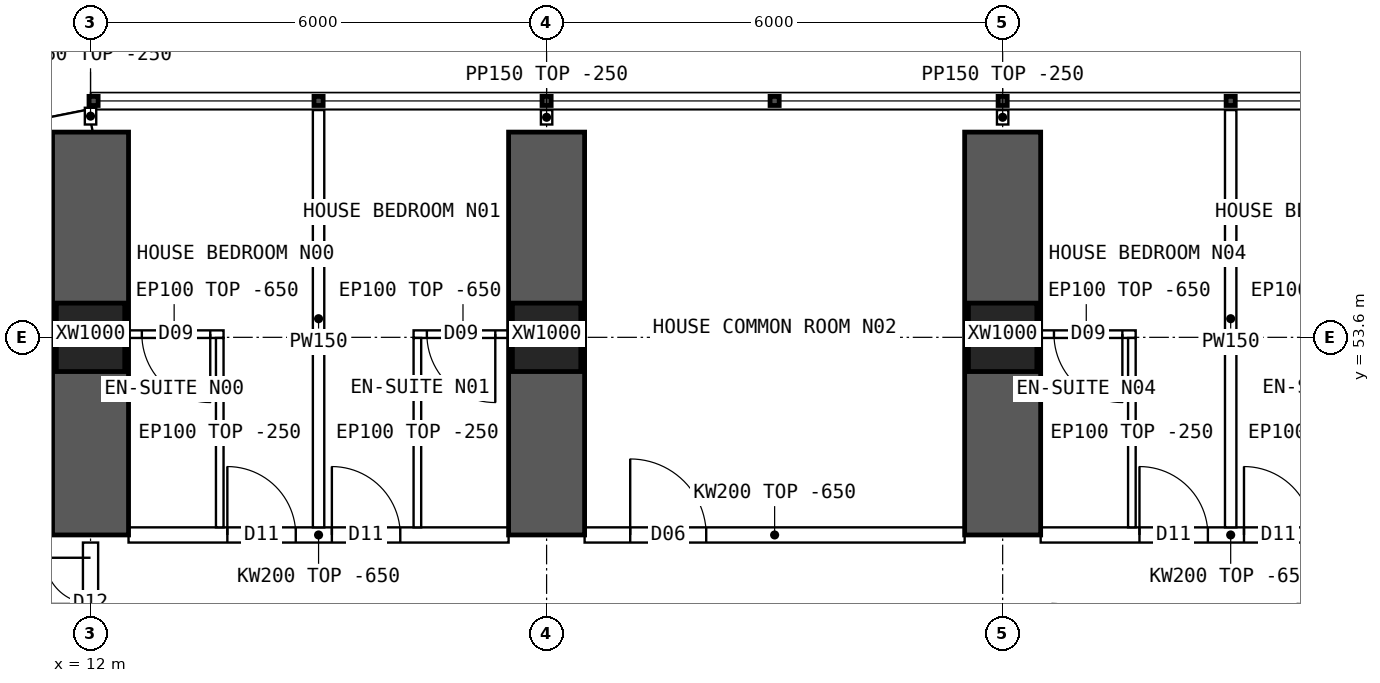
"""IFC4 building model, lengths in metres.
Left out: names, types, materials, properties, quantities, classifications, styles, units other than length and angle.
Written with IfcOpenShell. Run it as: python <this file> out.ifc"""

import sys

from ifc_helpers import new_model, si_unit, direction, frame, frame_2d, origin, origin_2d, place, context, subcontext, project, spatial, polyline, rectangle, hollow_rectangle, outline, extrude, element, fill, save


model = new_model("IFC4")
c1 = context("Model", 3, precision=1e-05, world=origin(), true_north=direction((0.0, 1.0)))
c2 = subcontext(c1, "Body", "Model", "MODEL_VIEW")
j1 = project(units=[si_unit("LENGTHUNIT", "METRE"), si_unit("PLANEANGLEUNIT", "RADIAN")], contexts=[c1])
p1 = place(None, origin())
s1 = spatial("IfcSite", under=j1, at=p1, CompositionType="ELEMENT")
p2 = place(p1, origin())
s2 = spatial("IfcBuilding", under=s1, at=p2, CompositionType="ELEMENT")
p3 = place(p2, frame((0.0, 0.0, 61.45)))
s3 = spatial("IfcBuildingStorey", under=s2, at=p3, CompositionType="ELEMENT", Elevation=61.45)
for number, where, z_axis, x_axis in (
    (1, (12.0, 53.6, 0.0), (0.0, 0.0, 1.0), (1.0, 0.0, 0.0)),
    (2, (18.0, 53.6, 0.0), (0.0, 0.0, 1.0), (1.0, 0.0, 0.0)),
    (3, (24.0, 53.6, 0.0), (0.0, 0.0, 1.0), (1.0, 0.0, 0.0)),
):
    element("IfcColumn", number, at=place(p3, frame(where, z_axis=z_axis, x_axis=x_axis)), inside=s3, PredefinedType="COLUMN", context=c2, shape_type="SweptSolid", body=[
        extrude(hollow_rectangle(XDim=0.9, YDim=0.9, WallThickness=0.09, at=origin_2d()), origin(), (0.0, 0.0, 1.0), 3.75),
    ])
for number, where, z_axis, x_axis in (
    (4, (12.0, 51.0, 0.0), (0.0, 0.0, 1.0), (0.0, 1.0, 0.0)),
    (5, (18.0, 51.0, 0.0), (0.0, 0.0, 1.0), (0.0, 1.0, 0.0)),
    (6, (24.0, 51.0, 0.0), (0.0, 0.0, 1.0), (0.0, 1.0, 0.0)),
):
    element("IfcWall", number, at=place(p3, frame(where, z_axis=z_axis, x_axis=x_axis)), inside=s3, PredefinedType="SHEAR", context=c2, shape_type="SweptSolid", body=[
        extrude(rectangle(XDim=5.3, YDim=1.0, at=frame_2d((2.65, 0.0))), origin(), (0.0, 0.0, 1.0), 3.75),
    ])
p4 = place(p3, frame((12.0, 56.45, 0.0), z_axis=(0.0, 0.0, 1.0), x_axis=(-0.980787251524, -0.195080412259, 0.0)))
e7 = element("IfcWall", 7, at=p4, inside=s3, PredefinedType="SOLIDWALL", context=c2, shape_type="SweptSolid", body=[
    extrude(outline(polyline([(-0.03, -0.15), (3.249, -0.15), (3.189, 0.15), (0.03, 0.15), (-0.03, -0.15)])), origin(), (0.0, 0.0, 1.0), 3.5),
])
p5 = place(p4, frame((0.909, 0.0, 0.9)))
e8 = element("IfcOpeningElement", 8, at=p5, cuts=e7, PredefinedType="OPENING", context=c2, shape_type="SweptSolid", body=[
    extrude(rectangle(XDim=1.4, YDim=1.8, at=frame_2d((0.7, 0.9))), frame((0.0, 0.16, 0.0), z_axis=(0.0, -1.0, 0.0), x_axis=(1.0, 0.0, 0.0)), (0.0, 0.0, 1.0), 0.32),
])
p6 = place(p3, frame((12.5, 51.0, 0.0), z_axis=(0.0, 0.0, 1.0), x_axis=(1.0, 0.0, 0.0)))
e9 = element("IfcWall", 9, at=p6, inside=s3, PredefinedType="SOLIDWALL", context=c2, shape_type="SweptSolid", body=[
    extrude(outline(polyline([(0.0, 0.0), (5.0, 0.0), (5.0, 3.1), (0.0, 3.1), (0.0, 0.0)])), frame((0.0, 0.1, 0.0), z_axis=(0.0, -1.0, 0.0), x_axis=(1.0, 0.0, 0.0)), (0.0, 0.0, 1.0), 0.2),
])
p7 = place(p6, frame((1.3, 0.0, 0.0)))
e10 = element("IfcOpeningElement", 10, at=p7, cuts=e9, PredefinedType="OPENING", context=c2, shape_type="SweptSolid", body=[
    extrude(rectangle(XDim=0.9, YDim=2.1, at=frame_2d((0.45, 1.05))), frame((0.0, 0.11, 0.0), z_axis=(0.0, -1.0, 0.0), x_axis=(1.0, 0.0, 0.0)), (0.0, 0.0, 1.0), 0.22),
])
p8 = place(p6, frame((2.675, 0.0, 0.0)))
e11 = element("IfcOpeningElement", 11, at=p8, cuts=e9, PredefinedType="OPENING", context=c2, shape_type="SweptSolid", body=[
    extrude(rectangle(XDim=0.9, YDim=2.1, at=frame_2d((0.45, 1.05))), frame((0.0, 0.11, 0.0), z_axis=(0.0, -1.0, 0.0), x_axis=(1.0, 0.0, 0.0)), (0.0, 0.0, 1.0), 0.22),
])
p9 = place(p3, frame((18.5, 51.0, 0.0), z_axis=(0.0, 0.0, 1.0), x_axis=(1.0, 0.0, 0.0)))
e12 = element("IfcWall", 12, at=p9, inside=s3, PredefinedType="SOLIDWALL", context=c2, shape_type="SweptSolid", body=[
    extrude(outline(polyline([(0.0, 0.0), (5.0, 0.0), (5.0, 3.1), (0.0, 3.1), (0.0, 0.0)])), frame((0.0, 0.1, 0.0), z_axis=(0.0, -1.0, 0.0), x_axis=(1.0, 0.0, 0.0)), (0.0, 0.0, 1.0), 0.2),
])
p10 = place(p9, frame((0.6, 0.0, 0.0)))
e13 = element("IfcOpeningElement", 13, at=p10, cuts=e12, PredefinedType="OPENING", context=c2, shape_type="SweptSolid", body=[
    extrude(rectangle(XDim=1.0, YDim=2.1, at=frame_2d((0.5, 1.05))), frame((0.0, 0.11, 0.0), z_axis=(0.0, -1.0, 0.0), x_axis=(1.0, 0.0, 0.0)), (0.0, 0.0, 1.0), 0.22),
])
p11 = place(p3, frame((24.5, 51.0, 0.0), z_axis=(0.0, 0.0, 1.0), x_axis=(1.0, 0.0, 0.0)))
e14 = element("IfcWall", 14, at=p11, inside=s3, PredefinedType="SOLIDWALL", context=c2, shape_type="SweptSolid", body=[
    extrude(outline(polyline([(0.0, 0.0), (5.0, 0.0), (5.0, 3.1), (0.0, 3.1), (0.0, 0.0)])), frame((0.0, 0.1, 0.0), z_axis=(0.0, -1.0, 0.0), x_axis=(1.0, 0.0, 0.0)), (0.0, 0.0, 1.0), 0.2),
])
p12 = place(p11, frame((1.3, 0.0, 0.0)))
e15 = element("IfcOpeningElement", 15, at=p12, cuts=e14, PredefinedType="OPENING", context=c2, shape_type="SweptSolid", body=[
    extrude(rectangle(XDim=0.9, YDim=2.1, at=frame_2d((0.45, 1.05))), frame((0.0, 0.11, 0.0), z_axis=(0.0, -1.0, 0.0), x_axis=(1.0, 0.0, 0.0)), (0.0, 0.0, 1.0), 0.22),
])
p13 = place(p11, frame((2.675, 0.0, 0.0)))
e16 = element("IfcOpeningElement", 16, at=p13, cuts=e14, PredefinedType="OPENING", context=c2, shape_type="SweptSolid", body=[
    extrude(rectangle(XDim=0.9, YDim=2.1, at=frame_2d((0.45, 1.05))), frame((0.0, 0.11, 0.0), z_axis=(0.0, -1.0, 0.0), x_axis=(1.0, 0.0, 0.0)), (0.0, 0.0, 1.0), 0.22),
])
p14 = place(p3, frame((15.0, 56.59, 0.0), z_axis=(0.0, 0.0, 1.0), x_axis=(0.0, -1.0, 0.0)))
e17 = element("IfcWall", 17, at=p14, inside=s3, PredefinedType="PARTITIONING", context=c2, shape_type="SweptSolid", body=[
    extrude(outline(polyline([(0.0, 0.0), (5.49, 0.0), (5.49, 3.1), (5.442, 3.1), (5.44, 3.5), (3.192, 3.5), (3.19, 3.1), (2.792, 3.1), (2.79, 3.5), (0.0, 3.5), (0.0, 0.0)])), frame((0.0, 0.075, 0.0), z_axis=(0.0, -1.0, 0.0), x_axis=(1.0, 0.0, 0.0)), (0.0, 0.0, 1.0), 0.15),
])
p15 = place(p3, frame((12.45, 53.642, 0.0), z_axis=(0.0, 0.0, 1.0), x_axis=(1.0, 0.0, 0.0)))
e18 = element("IfcWall", 18, at=p15, inside=s3, PredefinedType="PARTITIONING", context=c2, shape_type="SweptSolid", body=[
    extrude(outline(polyline([(0.0, 0.0), (1.3, 0.0), (1.3, 3.1), (0.0, 3.1), (0.0, 0.0)])), frame((0.0, 0.05, 0.0), z_axis=(0.0, -1.0, 0.0), x_axis=(1.0, 0.0, 0.0)), (0.0, 0.0, 1.0), 0.1),
])
p16 = place(p15, frame((0.225, 0.0, 0.0)))
e19 = element("IfcOpeningElement", 19, at=p16, cuts=e18, PredefinedType="OPENING", context=c2, shape_type="SweptSolid", body=[
    extrude(rectangle(XDim=0.9, YDim=2.1, at=frame_2d((0.45, 1.05))), frame((0.0, 0.06, 0.0), z_axis=(0.0, -1.0, 0.0), x_axis=(1.0, 0.0, 0.0)), (0.0, 0.0, 1.0), 0.12),
])
p17 = place(p3, frame((13.7, 53.592, 0.0), z_axis=(0.0, 0.0, 1.0), x_axis=(0.0, -1.0, 0.0)))
e20 = element("IfcWall", 20, at=p17, inside=s3, PredefinedType="PARTITIONING", context=c2, shape_type="SweptSolid", body=[
    extrude(outline(polyline([(0.0, 0.0), (2.492, 0.0), (2.492, 3.1), (2.444, 3.1), (2.442, 3.5), (0.194, 3.5), (0.192, 3.1), (0.0, 3.1), (0.0, 0.0)])), frame((0.0, 0.05, 0.0), z_axis=(0.0, -1.0, 0.0), x_axis=(1.0, 0.0, 0.0)), (0.0, 0.0, 1.0), 0.1),
])
p18 = place(p3, frame((16.25, 53.642, 0.0), z_axis=(0.0, 0.0, 1.0), x_axis=(1.0, 0.0, 0.0)))
e21 = element("IfcWall", 21, at=p18, inside=s3, PredefinedType="PARTITIONING", context=c2, shape_type="SweptSolid", body=[
    extrude(outline(polyline([(0.0, 0.0), (1.3, 0.0), (1.3, 3.1), (0.0, 3.1), (0.0, 0.0)])), frame((0.0, 0.05, 0.0), z_axis=(0.0, -1.0, 0.0), x_axis=(1.0, 0.0, 0.0)), (0.0, 0.0, 1.0), 0.1),
])
p19 = place(p18, frame((0.175, 0.0, 0.0)))
e22 = element("IfcOpeningElement", 22, at=p19, cuts=e21, PredefinedType="OPENING", context=c2, shape_type="SweptSolid", body=[
    extrude(rectangle(XDim=0.9, YDim=2.1, at=frame_2d((0.45, 1.05))), frame((0.0, 0.06, 0.0), z_axis=(0.0, -1.0, 0.0), x_axis=(1.0, 0.0, 0.0)), (0.0, 0.0, 1.0), 0.12),
])
p20 = place(p3, frame((16.3, 53.592, 0.0), z_axis=(0.0, 0.0, 1.0), x_axis=(0.0, -1.0, 0.0)))
e23 = element("IfcWall", 23, at=p20, inside=s3, PredefinedType="PARTITIONING", context=c2, shape_type="SweptSolid", body=[
    extrude(outline(polyline([(0.0, 0.0), (2.492, 0.0), (2.492, 3.1), (2.444, 3.1), (2.442, 3.5), (0.194, 3.5), (0.192, 3.1), (0.0, 3.1), (0.0, 0.0)])), frame((0.0, 0.05, 0.0), z_axis=(0.0, -1.0, 0.0), x_axis=(1.0, 0.0, 0.0)), (0.0, 0.0, 1.0), 0.1),
])
p21 = place(p3, frame((27.0, 56.59, 0.0), z_axis=(0.0, 0.0, 1.0), x_axis=(0.0, -1.0, 0.0)))
e24 = element("IfcWall", 24, at=p21, inside=s3, PredefinedType="PARTITIONING", context=c2, shape_type="SweptSolid", body=[
    extrude(outline(polyline([(0.0, 0.0), (5.49, 0.0), (5.49, 3.1), (5.442, 3.1), (5.44, 3.5), (3.192, 3.5), (3.19, 3.1), (2.792, 3.1), (2.79, 3.5), (0.0, 3.5), (0.0, 0.0)])), frame((0.0, 0.075, 0.0), z_axis=(0.0, -1.0, 0.0), x_axis=(1.0, 0.0, 0.0)), (0.0, 0.0, 1.0), 0.15),
])
p22 = place(p3, frame((24.45, 53.642, 0.0), z_axis=(0.0, 0.0, 1.0), x_axis=(1.0, 0.0, 0.0)))
e25 = element("IfcWall", 25, at=p22, inside=s3, PredefinedType="PARTITIONING", context=c2, shape_type="SweptSolid", body=[
    extrude(outline(polyline([(0.0, 0.0), (1.3, 0.0), (1.3, 3.1), (0.0, 3.1), (0.0, 0.0)])), frame((0.0, 0.05, 0.0), z_axis=(0.0, -1.0, 0.0), x_axis=(1.0, 0.0, 0.0)), (0.0, 0.0, 1.0), 0.1),
])
p23 = place(p22, frame((0.225, 0.0, 0.0)))
e26 = element("IfcOpeningElement", 26, at=p23, cuts=e25, PredefinedType="OPENING", context=c2, shape_type="SweptSolid", body=[
    extrude(rectangle(XDim=0.9, YDim=2.1, at=frame_2d((0.45, 1.05))), frame((0.0, 0.06, 0.0), z_axis=(0.0, -1.0, 0.0), x_axis=(1.0, 0.0, 0.0)), (0.0, 0.0, 1.0), 0.12),
])
p24 = place(p3, frame((25.7, 53.592, 0.0), z_axis=(0.0, 0.0, 1.0), x_axis=(0.0, -1.0, 0.0)))
e27 = element("IfcWall", 27, at=p24, inside=s3, PredefinedType="PARTITIONING", context=c2, shape_type="SweptSolid", body=[
    extrude(outline(polyline([(0.0, 0.0), (2.492, 0.0), (2.492, 3.1), (2.444, 3.1), (2.442, 3.5), (0.194, 3.5), (0.192, 3.1), (0.0, 3.1), (0.0, 0.0)])), frame((0.0, 0.05, 0.0), z_axis=(0.0, -1.0, 0.0), x_axis=(1.0, 0.0, 0.0)), (0.0, 0.0, 1.0), 0.1),
])
p25 = place(p3, frame((12.0, 49.3, 0.0), z_axis=(0.0, 0.0, 1.0), x_axis=(0.0, 1.0, 0.0)))
e28 = element("IfcWall", 28, at=p25, inside=s3, PredefinedType="SOLIDWALL", context=c2, shape_type="SweptSolid", body=[
    extrude(outline(polyline([(0.0, 0.0), (1.6, 0.0), (1.6, 3.05), (0.0, 3.05), (0.0, 0.0)])), frame((0.0, 0.1, 0.0), z_axis=(0.0, -1.0, 0.0), x_axis=(1.0, 0.0, 0.0)), (0.0, 0.0, 1.0), 0.2),
])
p26 = place(p25, frame((0.2, 0.0, 0.0)))
e29 = element("IfcOpeningElement", 29, at=p26, cuts=e28, PredefinedType="OPENING", context=c2, shape_type="SweptSolid", body=[
    extrude(rectangle(XDim=1.2, YDim=2.1, at=frame_2d((0.6, 1.05))), frame((0.0, 0.11, 0.0), z_axis=(0.0, -1.0, 0.0), x_axis=(1.0, 0.0, 0.0)), (0.0, 0.0, 1.0), 0.22),
])
p27 = place(p3, frame((12.0, 56.4, 0.0), z_axis=(0.0, 0.0, 1.0), x_axis=(0.0, 1.0, 0.0)))
e30 = element("IfcWall", 30, at=p27, inside=s3, PredefinedType="PARTITIONING", context=c2, shape_type="SweptSolid", body=[
    extrude(rectangle(XDim=0.22, YDim=0.15, at=frame_2d((0.11, 0.0))), origin(), (0.0, 0.0, 1.0), 3.5),
])
for number, where, z_axis, x_axis in (
    (31, (18.0, 56.4, 0.0), (0.0, 0.0, 1.0), (0.0, 1.0, 0.0)),
    (32, (24.0, 56.4, 0.0), (0.0, 0.0, 1.0), (0.0, 1.0, 0.0)),
):
    element("IfcWall", number, at=place(p3, frame(where, z_axis=z_axis, x_axis=x_axis)), inside=s3, PredefinedType="PARTITIONING", context=c2, shape_type="SweptSolid", body=[
        extrude(rectangle(XDim=0.19, YDim=0.15, at=frame_2d((0.095, 0.0))), origin(), (0.0, 0.0, 1.0), 3.5),
    ])
p28 = place(p16, origin())
e33 = element("IfcDoor", 33, at=p28, inside=s3, OperationType="SINGLE_SWING_RIGHT", PredefinedType="DOOR", context=c2, shape_type="SweptSolid", body=[
    extrude(rectangle(XDim=0.9, YDim=2.1, at=frame_2d((0.45, 1.05))), frame((0.0, 0.025, 0.0), z_axis=(0.0, -1.0, 0.0), x_axis=(1.0, 0.0, 0.0)), (0.0, 0.0, 1.0), 0.05),
])
fill(e19, e33)
p29 = place(p7, origin())
e34 = element("IfcDoor", 34, at=p29, inside=s3, OperationType="SINGLE_SWING_LEFT", PredefinedType="DOOR", context=c2, shape_type="SweptSolid", body=[
    extrude(rectangle(XDim=0.9, YDim=2.1, at=frame_2d((0.45, 1.05))), frame((0.0, 0.025, 0.0), z_axis=(0.0, -1.0, 0.0), x_axis=(1.0, 0.0, 0.0)), (0.0, 0.0, 1.0), 0.05),
])
fill(e10, e34)
p30 = place(p19, origin())
e35 = element("IfcDoor", 35, at=p30, inside=s3, OperationType="SINGLE_SWING_RIGHT", PredefinedType="DOOR", context=c2, shape_type="SweptSolid", body=[
    extrude(rectangle(XDim=0.9, YDim=2.1, at=frame_2d((0.45, 1.05))), frame((0.0, 0.025, 0.0), z_axis=(0.0, -1.0, 0.0), x_axis=(1.0, 0.0, 0.0)), (0.0, 0.0, 1.0), 0.05),
])
fill(e22, e35)
p31 = place(p8, origin())
e36 = element("IfcDoor", 36, at=p31, inside=s3, OperationType="SINGLE_SWING_LEFT", PredefinedType="DOOR", context=c2, shape_type="SweptSolid", body=[
    extrude(rectangle(XDim=0.9, YDim=2.1, at=frame_2d((0.45, 1.05))), frame((0.0, 0.025, 0.0), z_axis=(0.0, -1.0, 0.0), x_axis=(1.0, 0.0, 0.0)), (0.0, 0.0, 1.0), 0.05),
])
fill(e11, e36)
p32 = place(p10, origin())
e37 = element("IfcDoor", 37, at=p32, inside=s3, OperationType="SINGLE_SWING_LEFT", PredefinedType="DOOR", context=c2, shape_type="SweptSolid", body=[
    extrude(rectangle(XDim=1.0, YDim=2.1, at=frame_2d((0.5, 1.05))), frame((0.0, 0.025, 0.0), z_axis=(0.0, -1.0, 0.0), x_axis=(1.0, 0.0, 0.0)), (0.0, 0.0, 1.0), 0.05),
])
fill(e13, e37)
p33 = place(p23, origin())
e38 = element("IfcDoor", 38, at=p33, inside=s3, OperationType="SINGLE_SWING_RIGHT", PredefinedType="DOOR", context=c2, shape_type="SweptSolid", body=[
    extrude(rectangle(XDim=0.9, YDim=2.1, at=frame_2d((0.45, 1.05))), frame((0.0, 0.025, 0.0), z_axis=(0.0, -1.0, 0.0), x_axis=(1.0, 0.0, 0.0)), (0.0, 0.0, 1.0), 0.05),
])
fill(e26, e38)
p34 = place(p12, origin())
e39 = element("IfcDoor", 39, at=p34, inside=s3, OperationType="SINGLE_SWING_LEFT", PredefinedType="DOOR", context=c2, shape_type="SweptSolid", body=[
    extrude(rectangle(XDim=0.9, YDim=2.1, at=frame_2d((0.45, 1.05))), frame((0.0, 0.025, 0.0), z_axis=(0.0, -1.0, 0.0), x_axis=(1.0, 0.0, 0.0)), (0.0, 0.0, 1.0), 0.05),
])
fill(e15, e39)
p35 = place(p13, origin())
e40 = element("IfcDoor", 40, at=p35, inside=s3, OperationType="SINGLE_SWING_LEFT", PredefinedType="DOOR", context=c2, shape_type="SweptSolid", body=[
    extrude(rectangle(XDim=0.9, YDim=2.1, at=frame_2d((0.45, 1.05))), frame((0.0, 0.025, 0.0), z_axis=(0.0, -1.0, 0.0), x_axis=(1.0, 0.0, 0.0)), (0.0, 0.0, 1.0), 0.05),
])
fill(e16, e40)
p36 = place(p26, origin())
e41 = element("IfcDoor", 41, at=p36, inside=s3, OperationType="DOUBLE_DOOR_SINGLE_SWING", PredefinedType="DOOR", context=c2, shape_type="SweptSolid", body=[
    extrude(rectangle(XDim=1.2, YDim=2.1, at=frame_2d((0.6, 1.05))), frame((0.0, 0.025, 0.0), z_axis=(0.0, -1.0, 0.0), x_axis=(1.0, 0.0, 0.0)), (0.0, 0.0, 1.0), 0.05),
])
fill(e29, e41)
save(model, sys.argv[1])
